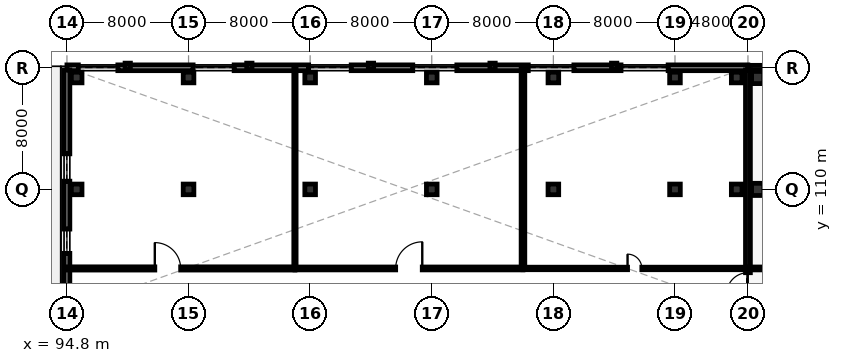
"""IFC4 building model, lengths in metres.
Left out: names, types, materials, properties, quantities, classifications, styles, units other than length and angle.
Written with IfcOpenShell. Run it as: python <this file> out.ifc"""

import sys

from ifc_helpers import new_model, si_unit, direction, frame, frame_2d, origin, origin_2d, place, context, subcontext, project, spatial, rectangle, extrude, element, fill, save


model = new_model("IFC4")
c1 = context("Model", 3, precision=1e-05, world=origin(), true_north=direction((0.0, 1.0)))
c2 = subcontext(c1, "Body", "Model", "MODEL_VIEW")
j1 = project(units=[si_unit("LENGTHUNIT", "METRE"), si_unit("PLANEANGLEUNIT", "RADIAN")], contexts=[c1])
p1 = place(None, origin())
s1 = spatial("IfcSite", under=j1, at=p1, CompositionType="ELEMENT")
p2 = place(p1, origin())
s2 = spatial("IfcBuilding", under=s1, at=p2, CompositionType="ELEMENT")
p3 = place(p2, origin())
s3 = spatial("IfcBuildingStorey", under=s2, at=p3, CompositionType="ELEMENT", Elevation=0.0)
for number, where, z_axis, x_axis in (
    (1, (95.44, 110.0, 0.0), (0.0, 0.0, 1.0), (1.0, 0.0, 0.0)),
    (2, (95.44, 117.36, 0.0), (0.0, 0.0, 1.0), (1.0, 0.0, 0.0)),
    (3, (102.8, 110.0, 0.0), (0.0, 0.0, 1.0), (1.0, 0.0, 0.0)),
    (4, (102.8, 117.36, 0.0), (0.0, 0.0, 1.0), (1.0, 0.0, 0.0)),
    (5, (110.8, 110.0, 0.0), (0.0, 0.0, 1.0), (1.0, 0.0, 0.0)),
    (6, (110.8, 117.36, 0.0), (0.0, 0.0, 1.0), (1.0, 0.0, 0.0)),
    (7, (118.8, 110.0, 0.0), (0.0, 0.0, 1.0), (1.0, 0.0, 0.0)),
    (8, (118.8, 117.36, 0.0), (0.0, 0.0, 1.0), (1.0, 0.0, 0.0)),
    (9, (126.8, 110.0, 0.0), (0.0, 0.0, 1.0), (1.0, 0.0, 0.0)),
    (10, (126.8, 117.36, 0.0), (0.0, 0.0, 1.0), (1.0, 0.0, 0.0)),
    (11, (134.8, 110.0, 0.0), (0.0, 0.0, 1.0), (1.0, 0.0, 0.0)),
    (12, (134.8, 117.36, 0.0), (0.0, 0.0, 1.0), (1.0, 0.0, 0.0)),
    (13, (138.86, 110.0, 0.0), (0.0, 0.0, 1.0), (1.0, 0.0, 0.0)),
    (14, (138.86, 117.36, 0.0), (0.0, 0.0, 1.0), (1.0, 0.0, 0.0)),
):
    element("IfcColumn", number, at=place(p3, frame(where, z_axis=z_axis, x_axis=x_axis)), inside=s3, PredefinedType="COLUMN", context=c2, shape_type="SweptSolid", body=[
        extrude(rectangle(XDim=0.7, YDim=0.7, at=origin_2d()), origin(), (0.0, 0.0, 1.0), 5.4),
    ])
for number, where, z_axis, x_axis in (
    (15, (140.24, 110.0, 0.0), (0.0, 0.0, 1.0), (1.0, 0.0, 0.0)),
    (16, (140.24, 117.36, 0.0), (0.0, 0.0, 1.0), (1.0, 0.0, 0.0)),
):
    element("IfcColumn", number, at=place(p3, frame(where, z_axis=z_axis, x_axis=x_axis)), inside=s3, PredefinedType="COLUMN", context=c2, shape_type="SweptSolid", body=[
        extrude(rectangle(XDim=0.8, YDim=0.8, at=origin_2d()), origin(), (0.0, 0.0, 1.0), 5.4),
    ])
for number, where, z_axis, x_axis in (
    (17, (98.8, 118.08, 0.0), (0.0, 0.0, 1.0), (0.0, 1.0, 0.0)),
    (18, (106.8, 118.08, 0.0), (0.0, 0.0, 1.0), (0.0, 1.0, 0.0)),
    (19, (114.8, 118.08, 0.0), (0.0, 0.0, 1.0), (0.0, 1.0, 0.0)),
    (20, (122.8, 118.08, 0.0), (0.0, 0.0, 1.0), (0.0, 1.0, 0.0)),
    (21, (130.8, 118.08, 0.0), (0.0, 0.0, 1.0), (0.0, 1.0, 0.0)),
):
    element("IfcColumn", number, at=place(p3, frame(where, z_axis=z_axis, x_axis=x_axis)), inside=s3, PredefinedType="PILASTER", context=c2, shape_type="SweptSolid", body=[
        extrude(rectangle(XDim=0.35, YDim=0.45, at=origin_2d()), origin(), (0.0, 0.0, 1.0), 5.4),
    ])
p4 = place(p3, frame((94.8, 118.0, 0.0), z_axis=(0.0, 0.0, 1.0), x_axis=(1.0, 0.0, 0.0)))
e22 = element("IfcWall", 22, at=p4, inside=s3, PredefinedType="SOLIDWALL", context=c2, shape_type="SweptSolid", body=[
    extrude(rectangle(XDim=44.795, YDim=0.38, at=frame_2d((22.397, 0.0))), origin(), (0.0, 0.0, 1.0), 5.12),
])
p5 = place(p4, frame((0.75, 0.0, 0.9)))
e23 = element("IfcOpeningElement", 23, at=p5, cuts=e22, PredefinedType="OPENING", context=c2, shape_type="SweptSolid", body=[
    extrude(rectangle(XDim=2.6, YDim=2.35, at=frame_2d((1.3, 1.175))), frame((0.0, 0.2, 0.0), z_axis=(0.0, -1.0, 0.0), x_axis=(1.0, 0.0, 0.0)), (0.0, 0.0, 1.0), 0.4),
])
p6 = place(p4, frame((8.3, 0.0, 0.9)))
e24 = element("IfcOpeningElement", 24, at=p6, cuts=e22, PredefinedType="OPENING", context=c2, shape_type="SweptSolid", body=[
    extrude(rectangle(XDim=2.7, YDim=2.35, at=frame_2d((1.35, 1.175))), frame((0.0, 0.2, 0.0), z_axis=(0.0, -1.0, 0.0), x_axis=(1.0, 0.0, 0.0)), (0.0, 0.0, 1.0), 0.4),
])
p7 = place(p4, frame((15.9, 0.0, 0.9)))
e25 = element("IfcOpeningElement", 25, at=p7, cuts=e22, PredefinedType="OPENING", context=c2, shape_type="SweptSolid", body=[
    extrude(rectangle(XDim=2.8, YDim=2.4, at=frame_2d((1.4, 1.2))), frame((0.0, 0.2, 0.0), z_axis=(0.0, -1.0, 0.0), x_axis=(1.0, 0.0, 0.0)), (0.0, 0.0, 1.0), 0.4),
])
p8 = place(p4, frame((22.75, 0.0, 0.9)))
e26 = element("IfcOpeningElement", 26, at=p8, cuts=e22, PredefinedType="OPENING", context=c2, shape_type="SweptSolid", body=[
    extrude(rectangle(XDim=2.9, YDim=2.4, at=frame_2d((1.45, 1.2))), frame((0.0, 0.2, 0.0), z_axis=(0.0, -1.0, 0.0), x_axis=(1.0, 0.0, 0.0)), (0.0, 0.0, 1.0), 0.4),
])
p9 = place(p4, frame((30.35, 0.0, 0.9)))
e27 = element("IfcOpeningElement", 27, at=p9, cuts=e22, PredefinedType="OPENING", context=c2, shape_type="SweptSolid", body=[
    extrude(rectangle(XDim=3.0, YDim=2.45, at=frame_2d((1.5, 1.225))), frame((0.0, 0.2, 0.0), z_axis=(0.0, -1.0, 0.0), x_axis=(1.0, 0.0, 0.0)), (0.0, 0.0, 1.0), 0.4),
])
p10 = place(p4, frame((36.45, 0.0, 0.9)))
e28 = element("IfcOpeningElement", 28, at=p10, cuts=e22, PredefinedType="OPENING", context=c2, shape_type="SweptSolid", body=[
    extrude(rectangle(XDim=3.1, YDim=2.45, at=frame_2d((1.55, 1.225))), frame((0.0, 0.2, 0.0), z_axis=(0.0, -1.0, 0.0), x_axis=(1.0, 0.0, 0.0)), (0.0, 0.0, 1.0), 0.4),
])
p11 = place(p3, frame((94.8, 102.14, 0.0), z_axis=(0.0, 0.0, 1.0), x_axis=(0.0, 1.0, 0.0)))
e29 = element("IfcWall", 29, at=p11, inside=s3, PredefinedType="SOLIDWALL", context=c2, shape_type="SweptSolid", body=[
    extrude(rectangle(XDim=15.72, YDim=0.38, at=frame_2d((7.86, 0.0))), origin(), (0.0, 0.0, 1.0), 5.12),
])
p12 = place(p11, frame((3.65, 0.0, 0.9)))
e30 = element("IfcOpeningElement", 30, at=p12, cuts=e29, PredefinedType="OPENING", context=c2, shape_type="SweptSolid", body=[
    extrude(rectangle(XDim=1.6, YDim=1.65, at=frame_2d((0.8, 0.825))), frame((0.0, 0.2, 0.0), z_axis=(0.0, -1.0, 0.0), x_axis=(1.0, 0.0, 0.0)), (0.0, 0.0, 1.0), 0.4),
])
p13 = place(p11, frame((8.4, 0.0, 0.9)))
e31 = element("IfcOpeningElement", 31, at=p13, cuts=e29, PredefinedType="OPENING", context=c2, shape_type="SweptSolid", body=[
    extrude(rectangle(XDim=1.8, YDim=1.65, at=frame_2d((0.9, 0.825))), frame((0.0, 0.2, 0.0), z_axis=(0.0, -1.0, 0.0), x_axis=(1.0, 0.0, 0.0)), (0.0, 0.0, 1.0), 0.4),
])
p14 = place(p3, frame((139.6, 118.0, 0.0), z_axis=(0.0, 0.0, 1.0), x_axis=(1.0, 0.0, 0.0)))
e32 = element("IfcWall", 32, at=p14, inside=s3, PredefinedType="SOLIDWALL", context=c2, shape_type="SweptSolid", body=[
    extrude(rectangle(XDim=32.4, YDim=0.32, at=frame_2d((16.2, 0.0))), origin(), (0.0, 0.0, 1.0), 5.14),
])
p15 = place(p14, frame((28.5, 0.0, 0.0)))
e33 = element("IfcOpeningElement", 33, at=p15, cuts=e32, PredefinedType="OPENING", context=c2, shape_type="SweptSolid", body=[
    extrude(rectangle(XDim=2.0, YDim=2.5, at=frame_2d((1.0, 1.25))), frame((0.0, 0.17, 0.0), z_axis=(0.0, -1.0, 0.0), x_axis=(1.0, 0.0, 0.0)), (0.0, 0.0, 1.0), 0.34),
])
p16 = place(p14, frame((2.2, 0.0, 0.9)))
e34 = element("IfcOpeningElement", 34, at=p16, cuts=e32, PredefinedType="OPENING", context=c2, shape_type="SweptSolid", body=[
    extrude(rectangle(XDim=3.6, YDim=2.6, at=frame_2d((1.8, 1.3))), frame((0.0, 0.17, 0.0), z_axis=(0.0, -1.0, 0.0), x_axis=(1.0, 0.0, 0.0)), (0.0, 0.0, 1.0), 0.34),
])
p17 = place(p14, frame((7.96, 0.0, 0.9)))
e35 = element("IfcOpeningElement", 35, at=p17, cuts=e32, PredefinedType="OPENING", context=c2, shape_type="SweptSolid", body=[
    extrude(rectangle(XDim=3.8, YDim=2.6, at=frame_2d((1.9, 1.3))), frame((0.0, 0.17, 0.0), z_axis=(0.0, -1.0, 0.0), x_axis=(1.0, 0.0, 0.0)), (0.0, 0.0, 1.0), 0.34),
])
p18 = place(p14, frame((13.72, 0.0, 0.9)))
e36 = element("IfcOpeningElement", 36, at=p18, cuts=e32, PredefinedType="OPENING", context=c2, shape_type="SweptSolid", body=[
    extrude(rectangle(XDim=1.6, YDim=1.65, at=frame_2d((0.8, 0.825))), frame((0.0, 0.17, 0.0), z_axis=(0.0, -1.0, 0.0), x_axis=(1.0, 0.0, 0.0)), (0.0, 0.0, 1.0), 0.34),
])
p19 = place(p14, frame((19.48, 0.0, 0.9)))
e37 = element("IfcOpeningElement", 37, at=p19, cuts=e32, PredefinedType="OPENING", context=c2, shape_type="SweptSolid", body=[
    extrude(rectangle(XDim=1.8, YDim=1.65, at=frame_2d((0.9, 0.825))), frame((0.0, 0.17, 0.0), z_axis=(0.0, -1.0, 0.0), x_axis=(1.0, 0.0, 0.0)), (0.0, 0.0, 1.0), 0.34),
])
p20 = place(p3, frame((139.6, 71.74, 0.0), z_axis=(0.0, 0.0, 1.0), x_axis=(0.0, 1.0, 0.0)))
e38 = element("IfcWall", 38, at=p20, inside=s3, PredefinedType="SOLIDWALL", context=c2, shape_type="SweptSolid", body=[
    extrude(rectangle(XDim=46.12, YDim=0.32, at=frame_2d((23.06, 0.0))), origin(), (0.0, 0.0, 1.0), 4.29),
])
p21 = place(p20, frame((31.38, 0.0, 0.0)))
e39 = element("IfcOpeningElement", 39, at=p21, cuts=e38, PredefinedType="OPENING", context=c2, shape_type="SweptSolid", body=[
    extrude(rectangle(XDim=1.4, YDim=2.25, at=frame_2d((0.7, 1.125))), frame((0.0, 0.17, 0.0), z_axis=(0.0, -1.0, 0.0), x_axis=(1.0, 0.0, 0.0)), (0.0, 0.0, 1.0), 0.34),
])
p22 = place(p3, frame((94.8, 104.8, 0.0), z_axis=(0.0, 0.0, 1.0), x_axis=(1.0, 0.0, 0.0)))
e40 = element("IfcWall", 40, at=p22, inside=s3, PredefinedType="PARTITIONING", context=c2, shape_type="SweptSolid", body=[
    extrude(rectangle(XDim=15.0, YDim=0.21, at=frame_2d((7.5, 0.0))), origin(), (0.0, 0.0, 1.0), 5.12),
])
p23 = place(p22, frame((5.78, 0.0, 0.0)))
e41 = element("IfcOpeningElement", 41, at=p23, cuts=e40, PredefinedType="OPENING", context=c2, shape_type="SweptSolid", body=[
    extrude(rectangle(XDim=1.7, YDim=2.3, at=frame_2d((0.85, 1.15))), frame((0.0, 0.115, 0.0), z_axis=(0.0, -1.0, 0.0), x_axis=(1.0, 0.0, 0.0)), (0.0, 0.0, 1.0), 0.23),
])
p24 = place(p3, frame((109.8, 104.8, 0.0), z_axis=(0.0, 0.0, 1.0), x_axis=(1.0, 0.0, 0.0)))
e42 = element("IfcWall", 42, at=p24, inside=s3, PredefinedType="PARTITIONING", context=c2, shape_type="SweptSolid", body=[
    extrude(rectangle(XDim=15.0, YDim=0.19, at=frame_2d((7.5, 0.0))), origin(), (0.0, 0.0, 1.0), 5.12),
])
p25 = place(p24, frame((6.625, 0.0, 0.0)))
e43 = element("IfcOpeningElement", 43, at=p25, cuts=e42, PredefinedType="OPENING", context=c2, shape_type="SweptSolid", body=[
    extrude(rectangle(XDim=1.75, YDim=2.35, at=frame_2d((0.875, 1.175))), frame((0.0, 0.105, 0.0), z_axis=(0.0, -1.0, 0.0), x_axis=(1.0, 0.0, 0.0)), (0.0, 0.0, 1.0), 0.21),
])
p26 = place(p3, frame((124.8, 104.8, 0.0), z_axis=(0.0, 0.0, 1.0), x_axis=(1.0, 0.0, 0.0)))
e44 = element("IfcWall", 44, at=p26, inside=s3, PredefinedType="PARTITIONING", context=c2, shape_type="SweptSolid", body=[
    extrude(rectangle(XDim=14.7, YDim=0.165, at=frame_2d((7.35, 0.0))), origin(), (0.0, 0.0, 1.0), 5.12),
])
p27 = place(p26, frame((6.88, 0.0, 0.0)))
e45 = element("IfcOpeningElement", 45, at=p27, cuts=e44, PredefinedType="OPENING", context=c2, shape_type="SweptSolid", body=[
    extrude(rectangle(XDim=0.94, YDim=2.15, at=frame_2d((0.47, 1.075))), frame((0.0, 0.093, 0.0), z_axis=(0.0, -1.0, 0.0), x_axis=(1.0, 0.0, 0.0)), (0.0, 0.0, 1.0), 0.185),
])
p28 = place(p3, frame((109.8, 118.0, 0.0), z_axis=(0.0, 0.0, 1.0), x_axis=(0.0, -1.0, 0.0)))
e46 = element("IfcWall", 46, at=p28, inside=s3, PredefinedType="PARTITIONING", context=c2, shape_type="SweptSolid", body=[
    extrude(rectangle(XDim=13.2, YDim=0.15, at=frame_2d((6.6, 0.0))), origin(), (0.0, 0.0, 1.0), 5.12),
])
p29 = place(p3, frame((124.8, 118.0, 0.0), z_axis=(0.0, 0.0, 1.0), x_axis=(0.0, -1.0, 0.0)))
e47 = element("IfcWall", 47, at=p29, inside=s3, PredefinedType="PARTITIONING", context=c2, shape_type="SweptSolid", body=[
    extrude(rectangle(XDim=13.2, YDim=0.24, at=frame_2d((6.6, 0.0))), origin(), (0.0, 0.0, 1.0), 5.12),
])
p30 = place(p3, frame((139.6, 104.8, 0.0), z_axis=(0.0, 0.0, 1.0), x_axis=(1.0, 0.0, 0.0)))
e48 = element("IfcWall", 48, at=p30, inside=s3, PredefinedType="PARTITIONING", context=c2, shape_type="SweptSolid", body=[
    extrude(rectangle(XDim=17.8, YDim=0.19, at=frame_2d((8.9, 0.0))), origin(), (0.0, 0.0, 1.0), 5.14),
])
p31 = place(p30, frame((8.38, 0.0, 0.0)))
e49 = element("IfcOpeningElement", 49, at=p31, cuts=e48, PredefinedType="OPENING", context=c2, shape_type="SweptSolid", body=[
    extrude(rectangle(XDim=1.04, YDim=2.2, at=frame_2d((0.52, 1.1))), frame((0.0, 0.105, 0.0), z_axis=(0.0, -1.0, 0.0), x_axis=(1.0, 0.0, 0.0)), (0.0, 0.0, 1.0), 0.21),
])
p32 = place(p30, frame((13.184, 0.0, 0.0)))
e50 = element("IfcOpeningElement", 50, at=p32, cuts=e48, PredefinedType="OPENING", context=c2, shape_type="SweptSolid", body=[
    extrude(rectangle(XDim=1.4, YDim=2.25, at=frame_2d((0.7, 1.125))), frame((0.0, 0.105, 0.0), z_axis=(0.0, -1.0, 0.0), x_axis=(1.0, 0.0, 0.0)), (0.0, 0.0, 1.0), 0.21),
])
p33 = place(p5, origin())
e51 = element("IfcWindow", 51, at=p33, inside=s3, PartitioningType="SINGLE_PANEL", PredefinedType="WINDOW", context=c2, shape_type="SweptSolid", body=[
    extrude(rectangle(XDim=2.6, YDim=2.35, at=frame_2d((1.3, 1.175))), frame((0.0, 0.03, 0.0), z_axis=(0.0, -1.0, 0.0), x_axis=(1.0, 0.0, 0.0)), (0.0, 0.0, 1.0), 0.06),
])
fill(e23, e51)
p34 = place(p6, origin())
e52 = element("IfcWindow", 52, at=p34, inside=s3, PartitioningType="SINGLE_PANEL", PredefinedType="WINDOW", context=c2, shape_type="SweptSolid", body=[
    extrude(rectangle(XDim=2.7, YDim=2.35, at=frame_2d((1.35, 1.175))), frame((0.0, 0.03, 0.0), z_axis=(0.0, -1.0, 0.0), x_axis=(1.0, 0.0, 0.0)), (0.0, 0.0, 1.0), 0.06),
])
fill(e24, e52)
p35 = place(p7, origin())
e53 = element("IfcWindow", 53, at=p35, inside=s3, PartitioningType="SINGLE_PANEL", PredefinedType="WINDOW", context=c2, shape_type="SweptSolid", body=[
    extrude(rectangle(XDim=2.8, YDim=2.4, at=frame_2d((1.4, 1.2))), frame((0.0, 0.03, 0.0), z_axis=(0.0, -1.0, 0.0), x_axis=(1.0, 0.0, 0.0)), (0.0, 0.0, 1.0), 0.06),
])
fill(e25, e53)
p36 = place(p8, origin())
e54 = element("IfcWindow", 54, at=p36, inside=s3, PartitioningType="SINGLE_PANEL", PredefinedType="WINDOW", context=c2, shape_type="SweptSolid", body=[
    extrude(rectangle(XDim=2.9, YDim=2.4, at=frame_2d((1.45, 1.2))), frame((0.0, 0.03, 0.0), z_axis=(0.0, -1.0, 0.0), x_axis=(1.0, 0.0, 0.0)), (0.0, 0.0, 1.0), 0.06),
])
fill(e26, e54)
p37 = place(p9, origin())
e55 = element("IfcWindow", 55, at=p37, inside=s3, PartitioningType="SINGLE_PANEL", PredefinedType="WINDOW", context=c2, shape_type="SweptSolid", body=[
    extrude(rectangle(XDim=3.0, YDim=2.45, at=frame_2d((1.5, 1.225))), frame((0.0, 0.03, 0.0), z_axis=(0.0, -1.0, 0.0), x_axis=(1.0, 0.0, 0.0)), (0.0, 0.0, 1.0), 0.06),
])
fill(e27, e55)
p38 = place(p10, origin())
e56 = element("IfcWindow", 56, at=p38, inside=s3, PartitioningType="SINGLE_PANEL", PredefinedType="WINDOW", context=c2, shape_type="SweptSolid", body=[
    extrude(rectangle(XDim=3.1, YDim=2.45, at=frame_2d((1.55, 1.225))), frame((0.0, 0.03, 0.0), z_axis=(0.0, -1.0, 0.0), x_axis=(1.0, 0.0, 0.0)), (0.0, 0.0, 1.0), 0.06),
])
fill(e28, e56)
p39 = place(p12, origin())
e57 = element("IfcWindow", 57, at=p39, inside=s3, PartitioningType="SINGLE_PANEL", PredefinedType="WINDOW", context=c2, shape_type="SweptSolid", body=[
    extrude(rectangle(XDim=1.6, YDim=1.65, at=frame_2d((0.8, 0.825))), frame((0.0, 0.03, 0.0), z_axis=(0.0, -1.0, 0.0), x_axis=(1.0, 0.0, 0.0)), (0.0, 0.0, 1.0), 0.06),
])
fill(e30, e57)
p40 = place(p13, origin())
e58 = element("IfcWindow", 58, at=p40, inside=s3, PartitioningType="SINGLE_PANEL", PredefinedType="WINDOW", context=c2, shape_type="SweptSolid", body=[
    extrude(rectangle(XDim=1.8, YDim=1.65, at=frame_2d((0.9, 0.825))), frame((0.0, 0.03, 0.0), z_axis=(0.0, -1.0, 0.0), x_axis=(1.0, 0.0, 0.0)), (0.0, 0.0, 1.0), 0.06),
])
fill(e31, e58)
p41 = place(p21, origin())
e59 = element("IfcDoor", 59, at=p41, inside=s3, OperationType="SINGLE_SWING_LEFT", PredefinedType="DOOR", context=c2, shape_type="SweptSolid", body=[
    extrude(rectangle(XDim=1.4, YDim=2.25, at=frame_2d((0.7, 1.125))), frame((0.0, 0.025, 0.0), z_axis=(0.0, -1.0, 0.0), x_axis=(1.0, 0.0, 0.0)), (0.0, 0.0, 1.0), 0.05),
])
fill(e39, e59)
p42 = place(p23, origin())
e60 = element("IfcDoor", 60, at=p42, inside=s3, OperationType="SINGLE_SWING_LEFT", PredefinedType="DOOR", context=c2, shape_type="SweptSolid", body=[
    extrude(rectangle(XDim=1.7, YDim=2.3, at=frame_2d((0.85, 1.15))), frame((0.0, 0.025, 0.0), z_axis=(0.0, -1.0, 0.0), x_axis=(1.0, 0.0, 0.0)), (0.0, 0.0, 1.0), 0.05),
])
fill(e41, e60)
p43 = place(p25, origin())
e61 = element("IfcDoor", 61, at=p43, inside=s3, OperationType="SINGLE_SWING_RIGHT", PredefinedType="DOOR", context=c2, shape_type="SweptSolid", body=[
    extrude(rectangle(XDim=1.75, YDim=2.35, at=frame_2d((0.875, 1.175))), frame((0.0, 0.025, 0.0), z_axis=(0.0, -1.0, 0.0), x_axis=(1.0, 0.0, 0.0)), (0.0, 0.0, 1.0), 0.05),
])
fill(e43, e61)
p44 = place(p27, origin())
e62 = element("IfcDoor", 62, at=p44, inside=s3, OperationType="SINGLE_SWING_LEFT", PredefinedType="DOOR", context=c2, shape_type="SweptSolid", body=[
    extrude(rectangle(XDim=0.94, YDim=2.15, at=frame_2d((0.47, 1.075))), frame((0.0, 0.025, 0.0), z_axis=(0.0, -1.0, 0.0), x_axis=(1.0, 0.0, 0.0)), (0.0, 0.0, 1.0), 0.05),
])
fill(e45, e62)
save(model, sys.argv[1])
